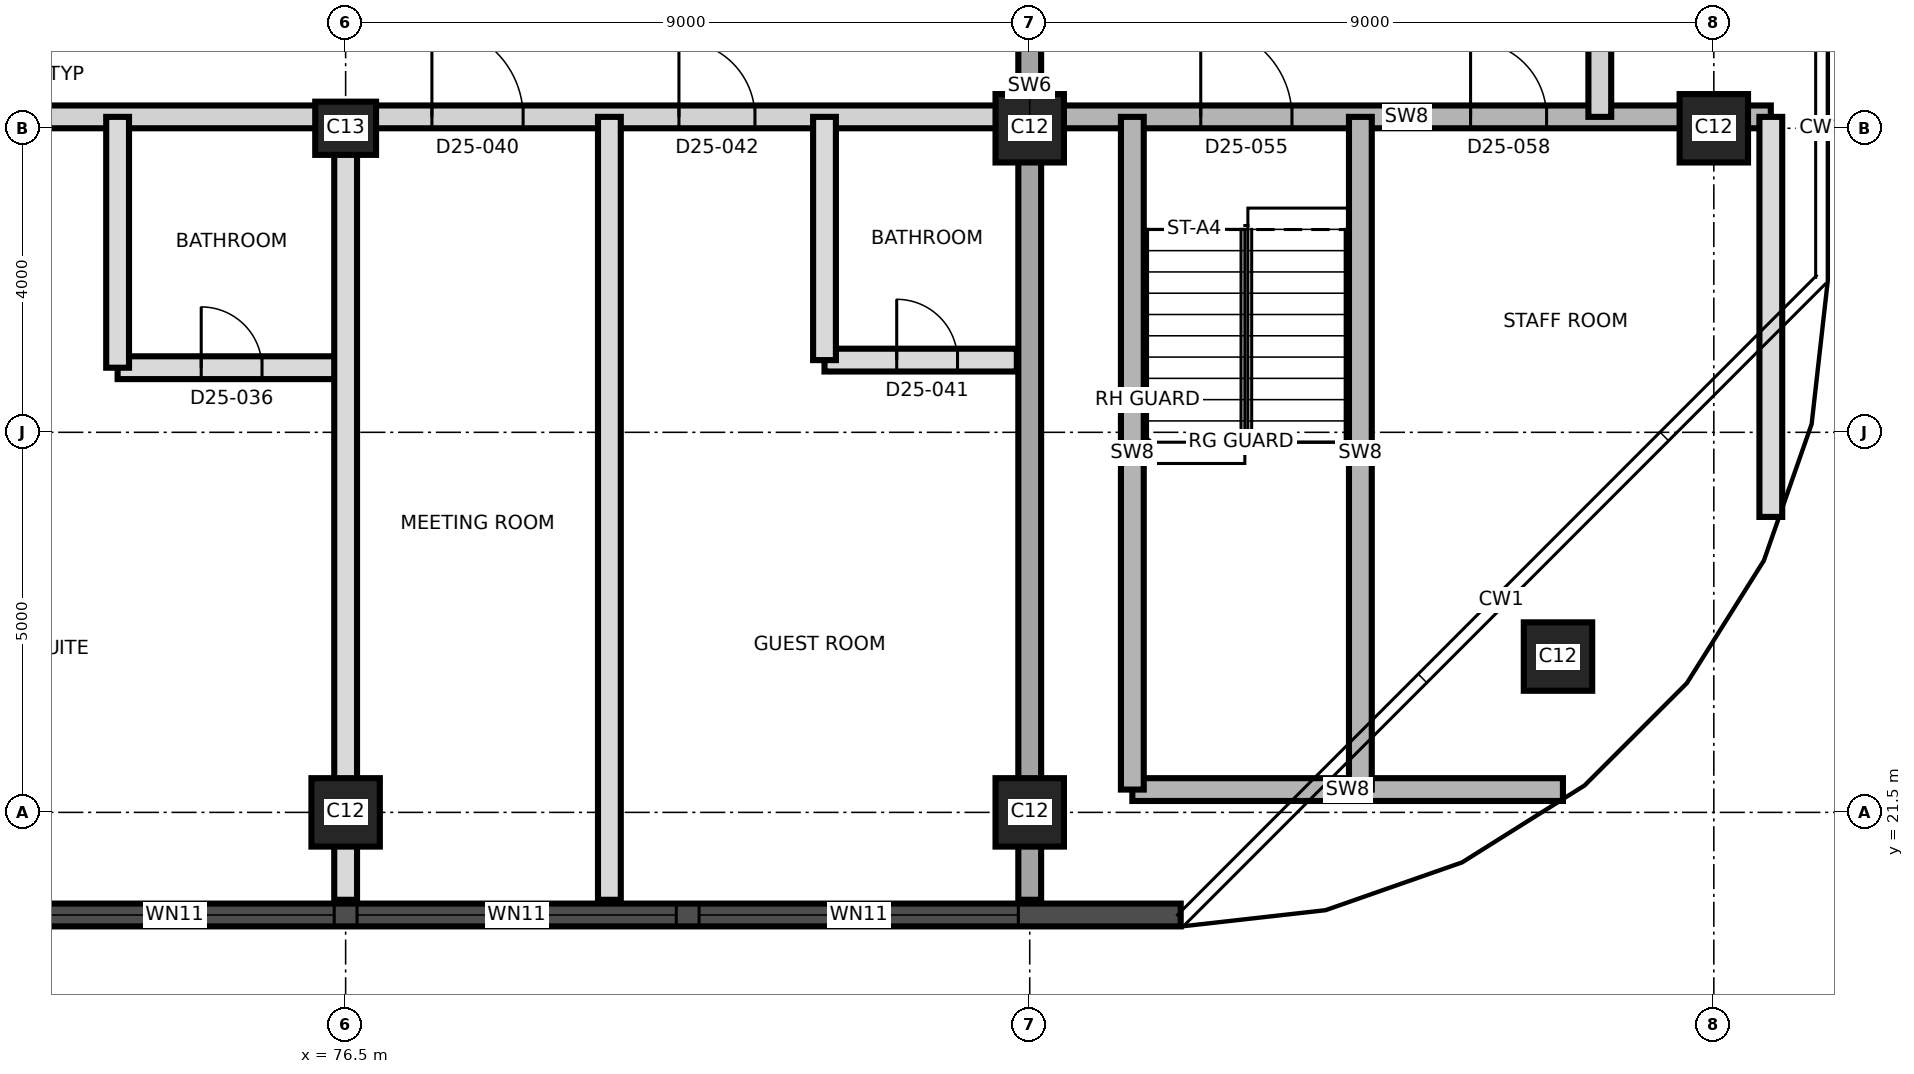
"""IFC4 building model, lengths in metres.
Left out: names, types, materials, properties, quantities, classifications, styles, units other than length and angle.
Written with IfcOpenShell. Run it as: python <this file> out.ifc"""

import sys

from ifc_helpers import new_model, si_unit, direction, frame, frame_2d, origin, origin_2d, place, context, subcontext, project, spatial, rectangle, extrude, element, fill, save


model = new_model("IFC4")
c1 = context("Model", 3, precision=1e-05, world=origin(), true_north=direction((0.0, 1.0)))
c2 = subcontext(c1, "Body", "Model", "MODEL_VIEW")
j1 = project(units=[si_unit("LENGTHUNIT", "METRE"), si_unit("PLANEANGLEUNIT", "RADIAN")], contexts=[c1])
p1 = place(None, origin())
s1 = spatial("IfcSite", under=j1, at=p1, CompositionType="ELEMENT")
p2 = place(p1, origin())
s2 = spatial("IfcBuilding", under=s1, at=p2, CompositionType="ELEMENT")
p3 = place(p2, frame((0.0, 0.0, 229.1)))
s3 = spatial("IfcBuildingStorey", under=s2, at=p3, CompositionType="ELEMENT", Elevation=229.1)
for number, where, z_axis, x_axis in (
    (1, (76.5, 21.5, 0.0), (0.0, 0.0, 1.0), (1.0, 0.0, 0.0)),
    (2, (85.5, 21.5, 0.0), (0.0, 0.0, 1.0), (1.0, 0.0, 0.0)),
    (3, (92.45, 23.55, 0.0), (0.0, 0.0, 1.0), (1.0, 0.0, 0.0)),
):
    element("IfcColumn", number, at=place(p3, frame(where, z_axis=z_axis, x_axis=x_axis)), inside=s3, PredefinedType="COLUMN", context=c2, shape_type="SweptSolid", body=[
        extrude(rectangle(XDim=0.9, YDim=0.9, at=origin_2d()), origin(), (0.0, 0.0, 1.0), 3.7),
    ])
p4 = place(p3, frame((76.5, 30.5, 0.0), z_axis=(0.0, 0.0, 1.0), x_axis=(1.0, 0.0, 0.0)))
e4 = element("IfcColumn", 4, at=p4, inside=s3, PredefinedType="COLUMN", context=c2, shape_type="SweptSolid", body=[
    extrude(rectangle(XDim=0.8, YDim=0.7, at=origin_2d()), origin(), (0.0, 0.0, 1.0), 3.7),
])
for number, where, z_axis, x_axis in (
    (5, (85.5, 30.5, 0.0), (0.0, 0.0, 1.0), (1.0, 0.0, 0.0)),
    (6, (94.5, 30.5, 0.0), (0.0, 0.0, 1.0), (1.0, 0.0, 0.0)),
):
    element("IfcColumn", number, at=place(p3, frame(where, z_axis=z_axis, x_axis=x_axis)), inside=s3, PredefinedType="COLUMN", context=c2, shape_type="SweptSolid", body=[
        extrude(rectangle(XDim=0.9, YDim=0.9, at=origin_2d()), origin(), (0.0, 0.0, 1.0), 3.7),
    ])
p5 = place(p3, frame((85.5, 20.35, 0.0), z_axis=(0.0, 0.0, 1.0), x_axis=(0.0, 1.0, 0.0)))
e7 = element("IfcWall", 7, at=p5, inside=s3, PredefinedType="SHEAR", context=c2, shape_type="SweptSolid", body=[
    extrude(rectangle(XDim=20.3, YDim=0.3, at=frame_2d((10.15, 0.0))), origin(), (0.0, 0.0, 1.0), 3.7),
])
p6 = place(p5, frame((11.35, 0.0, 0.0)))
e8 = element("IfcOpeningElement", 8, at=p6, cuts=e7, PredefinedType="OPENING", context=c2, shape_type="SweptSolid", body=[
    extrude(rectangle(XDim=1.4, YDim=2.1, at=frame_2d((0.7, 1.05))), frame((0.0, 0.16, 0.0), z_axis=(0.0, -1.0, 0.0), x_axis=(1.0, 0.0, 0.0)), (0.0, 0.0, 1.0), 0.32),
])
p7 = place(p3, frame((44.011, 20.15, 0.0), z_axis=(0.0, 0.0, 1.0), x_axis=(1.0, 0.0, 0.0)))
e9 = element("IfcWall", 9, at=p7, inside=s3, PredefinedType="SOLIDWALL", context=c2, shape_type="SweptSolid", body=[
    extrude(rectangle(XDim=43.476, YDim=0.3, at=frame_2d((21.738, 0.0))), origin(), (0.0, 0.0, 1.0), 3.4),
])
p8 = place(p7, frame((1.845, 0.0, 0.3)))
e10 = element("IfcOpeningElement", 10, at=p8, cuts=e9, PredefinedType="OPENING", context=c2, shape_type="SweptSolid", body=[
    extrude(rectangle(XDim=1.8, YDim=2.4, at=frame_2d((0.9, 1.2))), frame((0.0, 0.16, 0.0), z_axis=(0.0, -1.0, 0.0), x_axis=(1.0, 0.0, 0.0)), (0.0, 0.0, 1.0), 0.32),
])
p9 = place(p7, frame((5.639, 0.0, 0.9)))
e11 = element("IfcOpeningElement", 11, at=p9, cuts=e9, PredefinedType="OPENING", context=c2, shape_type="SweptSolid", body=[
    extrude(rectangle(XDim=4.2, YDim=1.5, at=frame_2d((2.1, 0.75))), frame((0.0, 0.16, 0.0), z_axis=(0.0, -1.0, 0.0), x_axis=(1.0, 0.0, 0.0)), (0.0, 0.0, 1.0), 0.32),
])
p10 = place(p7, frame((10.139, 0.0, 0.9)))
e12 = element("IfcOpeningElement", 12, at=p10, cuts=e9, PredefinedType="OPENING", context=c2, shape_type="SweptSolid", body=[
    extrude(rectangle(XDim=4.2, YDim=1.5, at=frame_2d((2.1, 0.75))), frame((0.0, 0.16, 0.0), z_axis=(0.0, -1.0, 0.0), x_axis=(1.0, 0.0, 0.0)), (0.0, 0.0, 1.0), 0.32),
])
p11 = place(p7, frame((14.639, 0.0, 0.9)))
e13 = element("IfcOpeningElement", 13, at=p11, cuts=e9, PredefinedType="OPENING", context=c2, shape_type="SweptSolid", body=[
    extrude(rectangle(XDim=4.2, YDim=1.5, at=frame_2d((2.1, 0.75))), frame((0.0, 0.16, 0.0), z_axis=(0.0, -1.0, 0.0), x_axis=(1.0, 0.0, 0.0)), (0.0, 0.0, 1.0), 0.32),
])
p12 = place(p7, frame((19.139, 0.0, 0.9)))
e14 = element("IfcOpeningElement", 14, at=p12, cuts=e9, PredefinedType="OPENING", context=c2, shape_type="SweptSolid", body=[
    extrude(rectangle(XDim=4.2, YDim=1.5, at=frame_2d((2.1, 0.75))), frame((0.0, 0.16, 0.0), z_axis=(0.0, -1.0, 0.0), x_axis=(1.0, 0.0, 0.0)), (0.0, 0.0, 1.0), 0.32),
])
p13 = place(p7, frame((23.639, 0.0, 0.9)))
e15 = element("IfcOpeningElement", 15, at=p13, cuts=e9, PredefinedType="OPENING", context=c2, shape_type="SweptSolid", body=[
    extrude(rectangle(XDim=4.2, YDim=1.5, at=frame_2d((2.1, 0.75))), frame((0.0, 0.16, 0.0), z_axis=(0.0, -1.0, 0.0), x_axis=(1.0, 0.0, 0.0)), (0.0, 0.0, 1.0), 0.32),
])
p14 = place(p7, frame((28.139, 0.0, 0.9)))
e16 = element("IfcOpeningElement", 16, at=p14, cuts=e9, PredefinedType="OPENING", context=c2, shape_type="SweptSolid", body=[
    extrude(rectangle(XDim=4.2, YDim=1.5, at=frame_2d((2.1, 0.75))), frame((0.0, 0.16, 0.0), z_axis=(0.0, -1.0, 0.0), x_axis=(1.0, 0.0, 0.0)), (0.0, 0.0, 1.0), 0.32),
])
p15 = place(p7, frame((32.639, 0.0, 0.9)))
e17 = element("IfcOpeningElement", 17, at=p15, cuts=e9, PredefinedType="OPENING", context=c2, shape_type="SweptSolid", body=[
    extrude(rectangle(XDim=4.2, YDim=1.5, at=frame_2d((2.1, 0.75))), frame((0.0, 0.16, 0.0), z_axis=(0.0, -1.0, 0.0), x_axis=(1.0, 0.0, 0.0)), (0.0, 0.0, 1.0), 0.32),
])
p16 = place(p7, frame((37.139, 0.0, 0.9)))
e18 = element("IfcOpeningElement", 18, at=p16, cuts=e9, PredefinedType="OPENING", context=c2, shape_type="SweptSolid", body=[
    extrude(rectangle(XDim=4.2, YDim=1.5, at=frame_2d((2.1, 0.75))), frame((0.0, 0.16, 0.0), z_axis=(0.0, -1.0, 0.0), x_axis=(1.0, 0.0, 0.0)), (0.0, 0.0, 1.0), 0.32),
])
p17 = place(p3, frame((86.85, 21.8, 0.0), z_axis=(0.0, 0.0, 1.0), x_axis=(1.0, 0.0, 0.0)))
e19 = element("IfcWall", 19, at=p17, inside=s3, PredefinedType="SHEAR", context=c2, shape_type="SweptSolid", body=[
    extrude(rectangle(XDim=5.665, YDim=0.3, at=frame_2d((2.833, 0.0))), origin(), (0.0, 0.0, 1.0), 3.4),
])
p18 = place(p3, frame((73.5, 27.35, 0.0), z_axis=(0.0, 0.0, 1.0), x_axis=(1.0, 0.0, 0.0)))
e20 = element("IfcWall", 20, at=p18, inside=s3, PredefinedType="PARTITIONING", context=c2, shape_type="SweptSolid", body=[
    extrude(rectangle(XDim=3.0, YDim=0.3, at=frame_2d((1.5, 0.0))), origin(), (0.0, 0.0, 1.0), 3.4),
])
p19 = place(p18, frame((1.1, 0.0, 0.0)))
e21 = element("IfcOpeningElement", 21, at=p19, cuts=e20, PredefinedType="OPENING", context=c2, shape_type="SweptSolid", body=[
    extrude(rectangle(XDim=0.8, YDim=2.1, at=frame_2d((0.4, 1.05))), frame((0.0, 0.16, 0.0), z_axis=(0.0, -1.0, 0.0), x_axis=(1.0, 0.0, 0.0)), (0.0, 0.0, 1.0), 0.32),
])
p20 = place(p3, frame((82.8, 27.45, 0.0), z_axis=(0.0, 0.0, 1.0), x_axis=(1.0, 0.0, 0.0)))
e22 = element("IfcWall", 22, at=p20, inside=s3, PredefinedType="PARTITIONING", context=c2, shape_type="SweptSolid", body=[
    extrude(rectangle(XDim=2.53, YDim=0.3, at=frame_2d((1.265, 0.0))), origin(), (0.0, 0.0, 1.0), 3.4),
])
p21 = place(p20, frame((0.95, 0.0, 0.0)))
e23 = element("IfcOpeningElement", 23, at=p21, cuts=e22, PredefinedType="OPENING", context=c2, shape_type="SweptSolid", body=[
    extrude(rectangle(XDim=0.8, YDim=2.1, at=frame_2d((0.4, 1.05))), frame((0.0, 0.16, 0.0), z_axis=(0.0, -1.0, 0.0), x_axis=(1.0, 0.0, 0.0)), (0.0, 0.0, 1.0), 0.32),
])
p22 = place(p3, frame((58.55, 30.65, 0.0), z_axis=(0.0, 0.0, 1.0), x_axis=(1.0, 0.0, 0.0)))
e24 = element("IfcWall", 24, at=p22, inside=s3, PredefinedType="PARTITIONING", context=c2, shape_type="SweptSolid", body=[
    extrude(rectangle(XDim=26.78, YDim=0.3, at=frame_2d((13.39, 0.0))), origin(), (0.0, 0.0, 1.0), 3.4),
])
p23 = place(p22, frame((1.65, 0.0, 0.0)))
e25 = element("IfcOpeningElement", 25, at=p23, cuts=e24, PredefinedType="OPENING", context=c2, shape_type="SweptSolid", body=[
    extrude(rectangle(XDim=1.2, YDim=2.1, at=frame_2d((0.6, 1.05))), frame((0.0, 0.16, 0.0), z_axis=(0.0, -1.0, 0.0), x_axis=(1.0, 0.0, 0.0)), (0.0, 0.0, 1.0), 0.32),
])
p24 = place(p22, frame((4.9, 0.0, 0.0)))
e26 = element("IfcOpeningElement", 26, at=p24, cuts=e24, PredefinedType="OPENING", context=c2, shape_type="SweptSolid", body=[
    extrude(rectangle(XDim=1.0, YDim=2.1, at=frame_2d((0.5, 1.05))), frame((0.0, 0.16, 0.0), z_axis=(0.0, -1.0, 0.0), x_axis=(1.0, 0.0, 0.0)), (0.0, 0.0, 1.0), 0.32),
])
p25 = place(p22, frame((12.95, 0.0, 0.0)))
e27 = element("IfcOpeningElement", 27, at=p25, cuts=e24, PredefinedType="OPENING", context=c2, shape_type="SweptSolid", body=[
    extrude(rectangle(XDim=1.0, YDim=2.4, at=frame_2d((0.5, 1.2))), frame((0.0, 0.16, 0.0), z_axis=(0.0, -1.0, 0.0), x_axis=(1.0, 0.0, 0.0)), (0.0, 0.0, 1.0), 0.32),
])
p26 = place(p22, frame((19.085, 0.0, 0.0)))
e28 = element("IfcOpeningElement", 28, at=p26, cuts=e24, PredefinedType="OPENING", context=c2, shape_type="SweptSolid", body=[
    extrude(rectangle(XDim=1.2, YDim=2.1, at=frame_2d((0.6, 1.05))), frame((0.0, 0.16, 0.0), z_axis=(0.0, -1.0, 0.0), x_axis=(1.0, 0.0, 0.0)), (0.0, 0.0, 1.0), 0.32),
])
p27 = place(p22, frame((22.335, 0.0, 0.0)))
e29 = element("IfcOpeningElement", 29, at=p27, cuts=e24, PredefinedType="OPENING", context=c2, shape_type="SweptSolid", body=[
    extrude(rectangle(XDim=1.0, YDim=2.1, at=frame_2d((0.5, 1.05))), frame((0.0, 0.16, 0.0), z_axis=(0.0, -1.0, 0.0), x_axis=(1.0, 0.0, 0.0)), (0.0, 0.0, 1.0), 0.32),
])
p28 = place(p3, frame((85.67, 30.65, 0.0), z_axis=(0.0, 0.0, 1.0), x_axis=(1.0, 0.0, 0.0)))
e30 = element("IfcWall", 30, at=p28, inside=s3, PredefinedType="SHEAR", context=c2, shape_type="SweptSolid", body=[
    extrude(rectangle(XDim=9.58, YDim=0.3, at=frame_2d((4.79, 0.0))), origin(), (0.0, 0.0, 1.0), 3.4),
])
p29 = place(p28, frame((2.08, 0.0, 0.0)))
e31 = element("IfcOpeningElement", 31, at=p29, cuts=e30, PredefinedType="OPENING", context=c2, shape_type="SweptSolid", body=[
    extrude(rectangle(XDim=1.2, YDim=2.1, at=frame_2d((0.6, 1.05))), frame((0.0, 0.16, 0.0), z_axis=(0.0, -1.0, 0.0), x_axis=(1.0, 0.0, 0.0)), (0.0, 0.0, 1.0), 0.32),
])
p30 = place(p28, frame((5.63, 0.0, 0.0)))
e32 = element("IfcOpeningElement", 32, at=p30, cuts=e30, PredefinedType="OPENING", context=c2, shape_type="SweptSolid", body=[
    extrude(rectangle(XDim=1.0, YDim=2.1, at=frame_2d((0.5, 1.05))), frame((0.0, 0.16, 0.0), z_axis=(0.0, -1.0, 0.0), x_axis=(1.0, 0.0, 0.0)), (0.0, 0.0, 1.0), 0.32),
])
p31 = place(p3, frame((73.5, 27.35, 0.0), z_axis=(0.0, 0.0, 1.0), x_axis=(0.0, 1.0, 0.0)))
e33 = element("IfcWall", 33, at=p31, inside=s3, PredefinedType="PARTITIONING", context=c2, shape_type="SweptSolid", body=[
    extrude(rectangle(XDim=3.3, YDim=0.3, at=frame_2d((1.65, 0.0))), origin(), (0.0, 0.0, 1.0), 3.4),
])
for number, where, z_axis, x_axis in (
    (34, (76.5, 20.35, 0.0), (0.0, 0.0, 1.0), (0.0, 1.0, 0.0)),
    (35, (79.97, 20.35, 0.0), (0.0, 0.0, 1.0), (0.0, 1.0, 0.0)),
):
    element("IfcWall", number, at=place(p3, frame(where, z_axis=z_axis, x_axis=x_axis)), inside=s3, PredefinedType="PARTITIONING", context=c2, shape_type="SweptSolid", body=[
        extrude(rectangle(XDim=10.3, YDim=0.3, at=frame_2d((5.15, 0.0))), origin(), (0.0, 0.0, 1.0), 3.4),
    ])
p32 = place(p3, frame((82.8, 27.45, 0.0), z_axis=(0.0, 0.0, 1.0), x_axis=(0.0, 1.0, 0.0)))
e36 = element("IfcWall", 36, at=p32, inside=s3, PredefinedType="PARTITIONING", context=c2, shape_type="SweptSolid", body=[
    extrude(rectangle(XDim=3.2, YDim=0.3, at=frame_2d((1.6, 0.0))), origin(), (0.0, 0.0, 1.0), 3.4),
])
for number, where, z_axis, x_axis in (
    (37, (86.85, 21.8, 0.0), (0.0, 0.0, 1.0), (0.0, 1.0, 0.0)),
    (38, (89.85, 21.8, 0.0), (0.0, 0.0, 1.0), (0.0, 1.0, 0.0)),
):
    element("IfcWall", number, at=place(p3, frame(where, z_axis=z_axis, x_axis=x_axis)), inside=s3, PredefinedType="SHEAR", context=c2, shape_type="SweptSolid", body=[
        extrude(rectangle(XDim=8.85, YDim=0.3, at=frame_2d((4.425, 0.0))), origin(), (0.0, 0.0, 1.0), 3.4),
    ])
p33 = place(p3, frame((93.0, 30.65, 0.0), z_axis=(0.0, 0.0, 1.0), x_axis=(0.0, 1.0, 0.0)))
e39 = element("IfcWall", 39, at=p33, inside=s3, PredefinedType="PARTITIONING", context=c2, shape_type="SweptSolid", body=[
    extrude(rectangle(XDim=2.7, YDim=0.3, at=frame_2d((1.35, 0.0))), origin(), (0.0, 0.0, 1.0), 3.4),
])
p34 = place(p3, frame((95.25, 25.387, 0.0), z_axis=(0.0, 0.0, 1.0), x_axis=(0.0, 1.0, 0.0)))
e40 = element("IfcWall", 40, at=p34, inside=s3, PredefinedType="PARTITIONING", context=c2, shape_type="SweptSolid", body=[
    extrude(rectangle(XDim=5.263, YDim=0.3, at=frame_2d((2.631, 0.0))), origin(), (0.0, 0.0, 1.0), 3.4),
])
p35 = place(p14, origin())
e41 = element("IfcWindow", 41, at=p35, inside=s3, PartitioningType="SINGLE_PANEL", PredefinedType="WINDOW", context=c2, shape_type="SweptSolid", body=[
    extrude(rectangle(XDim=4.2, YDim=1.5, at=frame_2d((2.1, 0.75))), frame((0.0, 0.03, 0.0), z_axis=(0.0, -1.0, 0.0), x_axis=(1.0, 0.0, 0.0)), (0.0, 0.0, 1.0), 0.06),
])
fill(e16, e41)
p36 = place(p15, origin())
e42 = element("IfcWindow", 42, at=p36, inside=s3, PartitioningType="SINGLE_PANEL", PredefinedType="WINDOW", context=c2, shape_type="SweptSolid", body=[
    extrude(rectangle(XDim=4.2, YDim=1.5, at=frame_2d((2.1, 0.75))), frame((0.0, 0.03, 0.0), z_axis=(0.0, -1.0, 0.0), x_axis=(1.0, 0.0, 0.0)), (0.0, 0.0, 1.0), 0.06),
])
fill(e17, e42)
p37 = place(p16, origin())
e43 = element("IfcWindow", 43, at=p37, inside=s3, PartitioningType="SINGLE_PANEL", PredefinedType="WINDOW", context=c2, shape_type="SweptSolid", body=[
    extrude(rectangle(XDim=4.2, YDim=1.5, at=frame_2d((2.1, 0.75))), frame((0.0, 0.03, 0.0), z_axis=(0.0, -1.0, 0.0), x_axis=(1.0, 0.0, 0.0)), (0.0, 0.0, 1.0), 0.06),
])
fill(e18, e43)
p38 = place(p19, origin())
e44 = element("IfcDoor", 44, at=p38, inside=s3, OperationType="SINGLE_SWING_RIGHT", PredefinedType="DOOR", context=c2, shape_type="SweptSolid", body=[
    extrude(rectangle(XDim=0.8, YDim=2.1, at=frame_2d((0.4, 1.05))), frame((0.0, 0.025, 0.0), z_axis=(0.0, -1.0, 0.0), x_axis=(1.0, 0.0, 0.0)), (0.0, 0.0, 1.0), 0.05),
])
fill(e21, e44)
p39 = place(p26, origin())
e45 = element("IfcDoor", 45, at=p39, inside=s3, OperationType="SINGLE_SWING_RIGHT", PredefinedType="DOOR", context=c2, shape_type="SweptSolid", body=[
    extrude(rectangle(XDim=1.2, YDim=2.1, at=frame_2d((0.6, 1.05))), frame((0.0, 0.025, 0.0), z_axis=(0.0, -1.0, 0.0), x_axis=(1.0, 0.0, 0.0)), (0.0, 0.0, 1.0), 0.05),
])
fill(e28, e45)
p40 = place(p21, origin())
e46 = element("IfcDoor", 46, at=p40, inside=s3, OperationType="SINGLE_SWING_LEFT", PredefinedType="DOOR", context=c2, shape_type="SweptSolid", body=[
    extrude(rectangle(XDim=0.8, YDim=2.1, at=frame_2d((0.4, 1.05))), frame((0.0, 0.025, 0.0), z_axis=(0.0, -1.0, 0.0), x_axis=(1.0, 0.0, 0.0)), (0.0, 0.0, 1.0), 0.05),
])
fill(e23, e46)
p41 = place(p27, origin())
e47 = element("IfcDoor", 47, at=p41, inside=s3, OperationType="SINGLE_SWING_LEFT", PredefinedType="DOOR", context=c2, shape_type="SweptSolid", body=[
    extrude(rectangle(XDim=1.0, YDim=2.1, at=frame_2d((0.5, 1.05))), frame((0.0, 0.025, 0.0), z_axis=(0.0, -1.0, 0.0), x_axis=(1.0, 0.0, 0.0)), (0.0, 0.0, 1.0), 0.05),
])
fill(e29, e47)
p42 = place(p29, origin())
e48 = element("IfcDoor", 48, at=p42, inside=s3, OperationType="SINGLE_SWING_LEFT", PredefinedType="DOOR", context=c2, shape_type="SweptSolid", body=[
    extrude(rectangle(XDim=1.2, YDim=2.1, at=frame_2d((0.6, 1.05))), frame((0.0, 0.025, 0.0), z_axis=(0.0, -1.0, 0.0), x_axis=(1.0, 0.0, 0.0)), (0.0, 0.0, 1.0), 0.05),
])
fill(e31, e48)
p43 = place(p30, origin())
e49 = element("IfcDoor", 49, at=p43, inside=s3, OperationType="SINGLE_SWING_LEFT", PredefinedType="DOOR", context=c2, shape_type="SweptSolid", body=[
    extrude(rectangle(XDim=1.0, YDim=2.1, at=frame_2d((0.5, 1.05))), frame((0.0, 0.025, 0.0), z_axis=(0.0, -1.0, 0.0), x_axis=(1.0, 0.0, 0.0)), (0.0, 0.0, 1.0), 0.05),
])
fill(e32, e49)
save(model, sys.argv[1])
